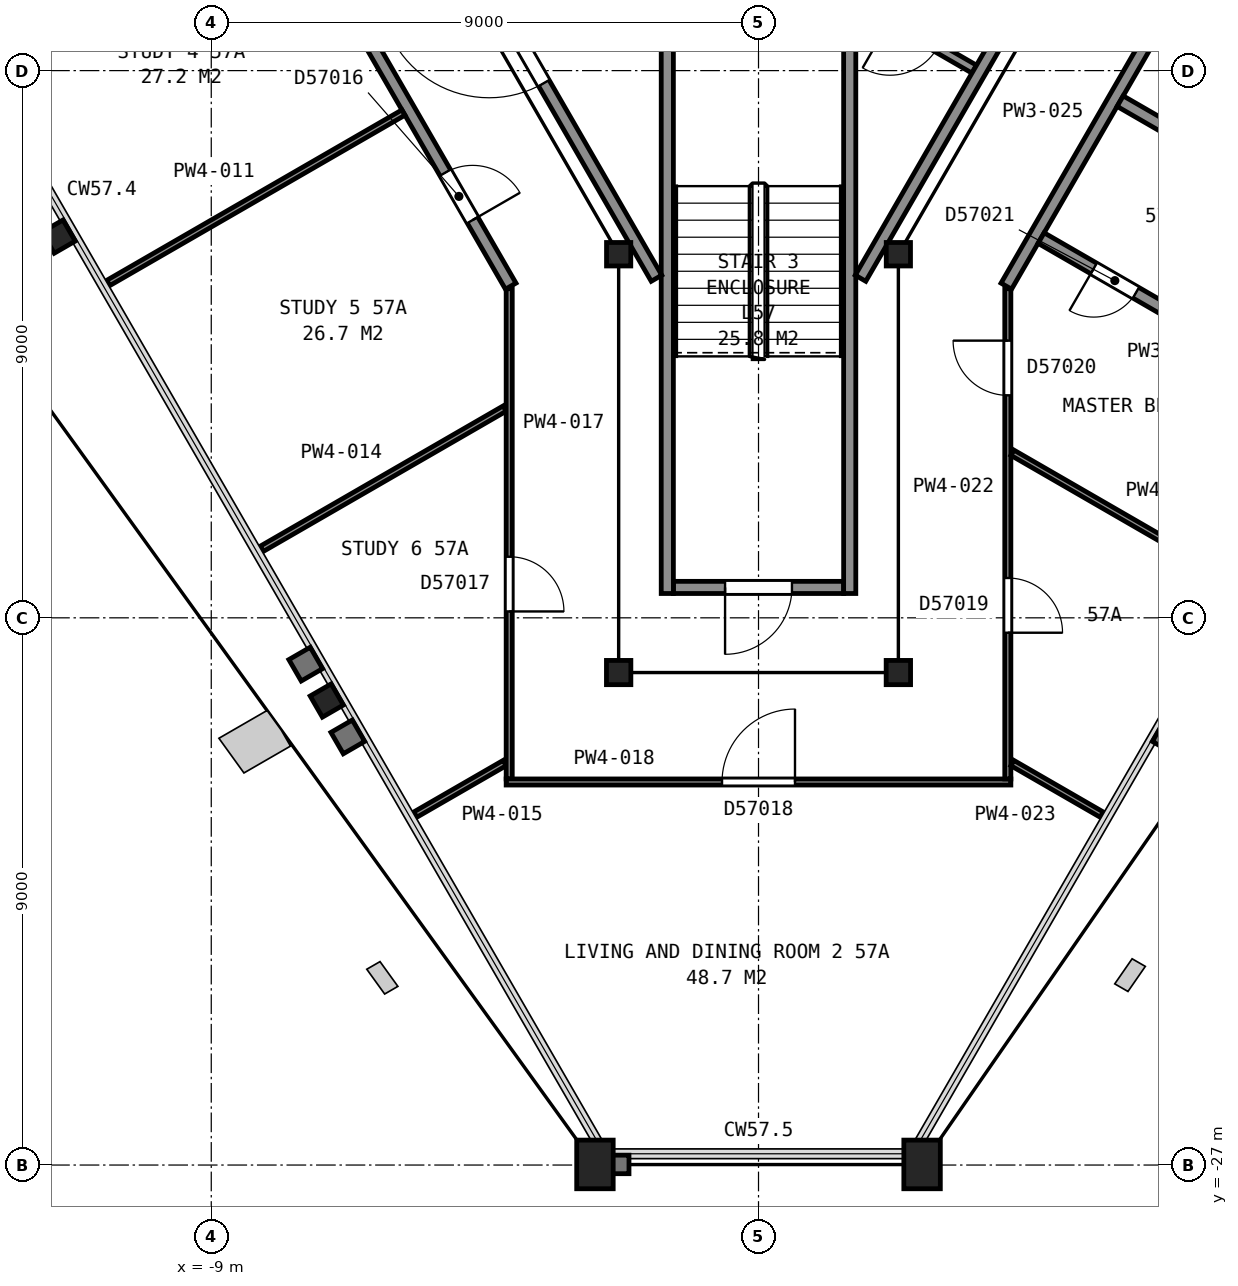
"""IFC4 building model, lengths in metres.
Left out: names, types, materials, properties, quantities, classifications, styles, units other than length and angle.
Written with IfcOpenShell. Run it as: python <this file> out.ifc"""

import sys

from ifc_helpers import new_model, si_unit, direction, frame, frame_2d, origin, origin_2d, place, context, subcontext, project, spatial, rectangle, hollow_rectangle, i_section, extrude, element, fill, save


model = new_model("IFC4")
c1 = context("Model", 3, precision=1e-05, world=origin(), true_north=direction((0.0, 1.0)))
c2 = subcontext(c1, "Body", "Model", "MODEL_VIEW")
j1 = project(units=[si_unit("LENGTHUNIT", "METRE"), si_unit("PLANEANGLEUNIT", "RADIAN")], contexts=[c1])
p1 = place(None, origin())
s1 = spatial("IfcSite", under=j1, at=p1, CompositionType="ELEMENT")
p2 = place(p1, origin())
s2 = spatial("IfcBuilding", under=s1, at=p2, CompositionType="ELEMENT")
p3 = place(p2, frame((0.0, 0.0, 228.6)))
s3 = spatial("IfcBuildingStorey", under=s2, at=p3, CompositionType="ELEMENT", Elevation=228.6)
for number, where, z_axis, x_axis in (
    (1, (-11.51, -11.73, 0.0), (0.0, 0.0, 1.0), (-0.5, 0.866, 0.0)),
    (2, (-7.1, -19.36, 0.0), (0.0, 0.0, 1.0), (-0.5, 0.866, 0.0)),
):
    element("IfcColumn", number, at=place(p3, frame(where, z_axis=z_axis, x_axis=x_axis)), inside=s3, PredefinedType="COLUMN", context=c2, shape_type="SweptSolid", body=[
        extrude(i_section(OverallWidth=0.401, OverallDepth=0.399, WebThickness=0.025, FlangeThickness=0.04, FilletRadius=0.015, at=origin_2d()), origin(), (0.0, 0.0, 1.0), 3.665),
    ])
for number, where, z_axis, x_axis in (
    (3, (-2.69, -26.99, 0.0), (0.0, 0.0, 1.0), (-1.0, 0.0, 0.0)),
    (4, (2.69, -26.99, 0.0), (0.0, 0.0, 1.0), (-1.0, 0.0, 0.0)),
):
    element("IfcColumn", number, at=place(p3, frame(where, z_axis=z_axis, x_axis=x_axis)), inside=s3, PredefinedType="COLUMN", context=c2, shape_type="SweptSolid", body=[
        extrude(hollow_rectangle(XDim=0.6, YDim=0.8, WallThickness=0.05, at=origin_2d()), origin(), (0.0, 0.0, 1.0), 3.635),
    ])
p4 = place(p3, frame((-2.3, -12.02, 0.0), z_axis=(0.0, 0.0, 1.0), x_axis=(1.0, 0.0, 0.0)))
e5 = element("IfcColumn", 5, at=p4, inside=s3, PredefinedType="COLUMN", context=c2, shape_type="SweptSolid", body=[
    extrude(i_section(OverallWidth=0.399, OverallDepth=0.386, WebThickness=0.021, FlangeThickness=0.033, FilletRadius=0.015, at=origin_2d()), origin(), (0.0, 0.0, 1.0), 3.7),
])
for number, where, z_axis, x_axis in (
    (6, (-2.3, -18.9, 0.0), (0.0, 0.0, 1.0), (-1.0, 0.0, 0.0)),
    (7, (2.3, -18.9, 0.0), (0.0, 0.0, 1.0), (-1.0, 0.0, 0.0)),
):
    element("IfcColumn", number, at=place(p3, frame(where, z_axis=z_axis, x_axis=x_axis)), inside=s3, PredefinedType="COLUMN", context=c2, shape_type="SweptSolid", body=[
        extrude(i_section(OverallWidth=0.401, OverallDepth=0.399, WebThickness=0.025, FlangeThickness=0.04, FilletRadius=0.015, at=origin_2d()), origin(), (0.0, 0.0, 1.0), 3.7),
    ])
p5 = place(p3, frame((2.3, -12.02, 0.0), z_axis=(0.0, 0.0, 1.0), x_axis=(1.0, 0.0, 0.0)))
e8 = element("IfcColumn", 8, at=p5, inside=s3, PredefinedType="COLUMN", context=c2, shape_type="SweptSolid", body=[
    extrude(i_section(OverallWidth=0.399, OverallDepth=0.386, WebThickness=0.021, FlangeThickness=0.033, FilletRadius=0.015, at=origin_2d()), origin(), (0.0, 0.0, 1.0), 3.7),
])
p6 = place(p3, frame((-1.4, -17.5, 0.0), z_axis=(0.0, 0.0, 1.0), x_axis=(1.0, 0.0, 0.0)))
e9 = element("IfcWall", 9, at=p6, inside=s3, PredefinedType="PARTITIONING", context=c2, shape_type="SweptSolid", body=[
    extrude(rectangle(XDim=2.8, YDim=0.2, at=frame_2d((1.4, 0.0))), origin(), (0.0, 0.0, 1.0), 3.45),
])
p7 = place(p6, frame((0.85, 0.0, 0.0)))
e10 = element("IfcOpeningElement", 10, at=p7, cuts=e9, PredefinedType="OPENING", context=c2, shape_type="SweptSolid", body=[
    extrude(rectangle(XDim=1.1, YDim=2.1, at=frame_2d((0.55, 1.05))), frame((0.0, 0.11, 0.0), z_axis=(0.0, -1.0, 0.0), x_axis=(1.0, 0.0, 0.0)), (0.0, 0.0, 1.0), 0.22),
])
for number, where, z_axis, x_axis in (
    (11, (1.5, -8.0, 0.0), (0.0, 0.0, 1.0), (0.0, -1.0, 0.0)),
    (12, (-1.5, -8.0, 0.0), (0.0, 0.0, 1.0), (0.0, -1.0, 0.0)),
):
    element("IfcWall", number, at=place(p3, frame(where, z_axis=z_axis, x_axis=x_axis)), inside=s3, PredefinedType="PARTITIONING", context=c2, shape_type="SweptSolid", body=[
        extrude(rectangle(XDim=9.6, YDim=0.2, at=frame_2d((4.8, 0.0))), origin(), (0.0, 0.0, 1.0), 3.45),
    ])
p8 = place(p3, frame((-4.655, -7.257, 0.0), z_axis=(0.0, 0.0, 1.0), x_axis=(0.499966124405, -0.866044960985, 0.0)))
e13 = element("IfcWall", 13, at=p8, inside=s3, PredefinedType="PARTITIONING", context=c2, shape_type="SweptSolid", body=[
    extrude(rectangle(XDim=5.956, YDim=0.2, at=frame_2d((2.978, 0.0))), origin(), (0.0, 0.0, 1.0), 3.45),
])
p9 = place(p8, frame((0.45, 0.0, 0.0)))
e14 = element("IfcOpeningElement", 14, at=p9, cuts=e13, PredefinedType="OPENING", context=c2, shape_type="SweptSolid", body=[
    extrude(rectangle(XDim=1.8, YDim=2.1, at=frame_2d((0.9, 1.05))), frame((0.0, 0.11, 0.0), z_axis=(0.0, -1.0, 0.0), x_axis=(1.0, 0.0, 0.0)), (0.0, 0.0, 1.0), 0.22),
])
p10 = place(p3, frame((1.404, -7.739, 0.0), z_axis=(0.0, 0.0, 1.0), x_axis=(0.866006523861, -0.500032699561, 0.0)))
e15 = element("IfcWall", 15, at=p10, inside=s3, PredefinedType="PARTITIONING", context=c2, shape_type="SweptSolid", body=[
    extrude(rectangle(XDim=2.475, YDim=0.15, at=frame_2d((1.237, 0.0))), origin(), (0.0, 0.0, 1.0), 3.45),
])
p11 = place(p10, frame((0.875, 0.0, 0.0)))
e16 = element("IfcOpeningElement", 16, at=p11, cuts=e15, PredefinedType="OPENING", context=c2, shape_type="SweptSolid", body=[
    extrude(rectangle(XDim=0.9, YDim=2.1, at=frame_2d((0.45, 1.05))), frame((0.0, 0.085, 0.0), z_axis=(0.0, -1.0, 0.0), x_axis=(1.0, 0.0, 0.0)), (0.0, 0.0, 1.0), 0.17),
])
p12 = place(p3, frame((1.677, -12.415, 0.0), z_axis=(0.0, 0.0, 1.0), x_axis=(0.500054337157, 0.865994029939, 0.0)))
e17 = element("IfcWall", 17, at=p12, inside=s3, PredefinedType="PARTITIONING", context=c2, shape_type="SweptSolid", body=[
    extrude(rectangle(XDim=6.177, YDim=0.2, at=frame_2d((3.088, 0.0))), origin(), (0.0, 0.0, 1.0), 3.45),
])
p13 = place(p3, frame((-4.075, -12.545, 0.0), z_axis=(0.0, 0.0, 1.0), x_axis=(-0.499997769292, 0.86602669168, 0.0)))
e18 = element("IfcWall", 18, at=p13, inside=s3, PredefinedType="PARTITIONING", context=c2, shape_type="SweptSolid", body=[
    extrude(rectangle(XDim=17.706, YDim=0.2, at=frame_2d((8.853, 0.0))), origin(), (0.0, 0.0, 1.0), 2.713),
])
p14 = place(p13, frame((14.138, 0.0, 0.0)))
e19 = element("IfcOpeningElement", 19, at=p14, cuts=e18, PredefinedType="OPENING", context=c2, shape_type="SweptSolid", body=[
    extrude(rectangle(XDim=0.9, YDim=2.1, at=frame_2d((0.45, 1.05))), frame((0.0, 0.11, 0.0), z_axis=(0.0, -1.0, 0.0), x_axis=(1.0, 0.0, 0.0)), (0.0, 0.0, 1.0), 0.22),
])
p15 = place(p13, frame((11.328, 0.0, 0.0)))
e20 = element("IfcOpeningElement", 20, at=p15, cuts=e18, PredefinedType="OPENING", context=c2, shape_type="SweptSolid", body=[
    extrude(rectangle(XDim=0.9, YDim=2.1, at=frame_2d((0.45, 1.05))), frame((0.0, 0.11, 0.0), z_axis=(0.0, -1.0, 0.0), x_axis=(1.0, 0.0, 0.0)), (0.0, 0.0, 1.0), 0.22),
])
p16 = place(p13, frame((5.454, 0.0, 0.0)))
e21 = element("IfcOpeningElement", 21, at=p16, cuts=e18, PredefinedType="OPENING", context=c2, shape_type="SweptSolid", body=[
    extrude(rectangle(XDim=0.9, YDim=2.1, at=frame_2d((0.45, 1.05))), frame((0.0, 0.11, 0.0), z_axis=(0.0, -1.0, 0.0), x_axis=(1.0, 0.0, 0.0)), (0.0, 0.0, 1.0), 0.22),
])
p17 = place(p13, frame((1.255, 0.0, 0.0)))
e22 = element("IfcOpeningElement", 22, at=p17, cuts=e18, PredefinedType="OPENING", context=c2, shape_type="SweptSolid", body=[
    extrude(rectangle(XDim=0.9, YDim=2.1, at=frame_2d((0.45, 1.05))), frame((0.0, 0.11, 0.0), z_axis=(0.0, -1.0, 0.0), x_axis=(1.0, 0.0, 0.0)), (0.0, 0.0, 1.0), 0.22),
])
p18 = place(p3, frame((-10.693, -12.492, 0.0), z_axis=(0.0, 0.0, 1.0), x_axis=(0.866017266313, 0.500014094249, 0.0)))
e23 = element("IfcWall", 23, at=p18, inside=s3, PredefinedType="PARTITIONING", context=c2, shape_type="SweptSolid", body=[
    extrude(rectangle(XDim=5.604, YDim=0.1, at=frame_2d((2.802, 0.0))), origin(), (0.0, 0.0, 1.0), 2.713),
])
p19 = place(p3, frame((-8.168, -16.864, 0.0), z_axis=(0.0, 0.0, 1.0), x_axis=(0.865969539539, 0.50009674723, 0.0)))
e24 = element("IfcWall", 24, at=p19, inside=s3, PredefinedType="PARTITIONING", context=c2, shape_type="SweptSolid", body=[
    extrude(rectangle(XDim=4.611, YDim=0.1, at=frame_2d((2.305, 0.0))), origin(), (0.0, 0.0, 1.0), 2.713),
])
p20 = place(p3, frame((-5.644, -21.236, 0.0), z_axis=(0.0, 0.0, 1.0), x_axis=(0.866046548355, 0.49996337474, 0.0)))
e25 = element("IfcWall", 25, at=p20, inside=s3, PredefinedType="PARTITIONING", context=c2, shape_type="SweptSolid", body=[
    extrude(rectangle(XDim=1.696, YDim=0.1, at=frame_2d((0.848, 0.0))), origin(), (0.0, 0.0, 1.0), 2.713),
])
p21 = place(p3, frame((-4.1, -20.65, 0.0), z_axis=(0.0, 0.0, 1.0), x_axis=(0.0, 1.0, 0.0)))
e26 = element("IfcWall", 26, at=p21, inside=s3, PredefinedType="PARTITIONING", context=c2, shape_type="SweptSolid", body=[
    extrude(rectangle(XDim=8.063, YDim=0.1, at=frame_2d((4.031, 0.0))), origin(), (0.0, 0.0, 1.0), 2.713),
])
p22 = place(p21, frame((2.755, 0.0, 0.0)))
e27 = element("IfcOpeningElement", 27, at=p22, cuts=e26, PredefinedType="OPENING", context=c2, shape_type="SweptSolid", body=[
    extrude(rectangle(XDim=0.9, YDim=2.1, at=frame_2d((0.45, 1.05))), frame((0.0, 0.06, 0.0), z_axis=(0.0, -1.0, 0.0), x_axis=(1.0, 0.0, 0.0)), (0.0, 0.0, 1.0), 0.12),
])
p23 = place(p3, frame((4.15, -20.7, 0.0), z_axis=(0.0, 0.0, 1.0), x_axis=(-1.0, 0.0, 0.0)))
e28 = element("IfcWall", 28, at=p23, inside=s3, PredefinedType="PARTITIONING", context=c2, shape_type="SweptSolid", body=[
    extrude(rectangle(XDim=8.3, YDim=0.1, at=frame_2d((4.15, 0.0))), origin(), (0.0, 0.0, 1.0), 2.713),
])
p24 = place(p23, frame((3.55, 0.0, 0.0)))
e29 = element("IfcOpeningElement", 29, at=p24, cuts=e28, PredefinedType="OPENING", context=c2, shape_type="SweptSolid", body=[
    extrude(rectangle(XDim=1.2, YDim=2.1, at=frame_2d((0.6, 1.05))), frame((0.0, 0.06, 0.0), z_axis=(0.0, -1.0, 0.0), x_axis=(1.0, 0.0, 0.0)), (0.0, 0.0, 1.0), 0.12),
])
p25 = place(p3, frame((4.1, -12.587, 0.0), z_axis=(0.0, 0.0, 1.0), x_axis=(0.0, -1.0, 0.0)))
e30 = element("IfcWall", 30, at=p25, inside=s3, PredefinedType="PARTITIONING", context=c2, shape_type="SweptSolid", body=[
    extrude(rectangle(XDim=8.063, YDim=0.1, at=frame_2d((4.031, 0.0))), origin(), (0.0, 0.0, 1.0), 2.713),
])
p26 = place(p25, frame((4.758, 0.0, 0.0)))
e31 = element("IfcOpeningElement", 31, at=p26, cuts=e30, PredefinedType="OPENING", context=c2, shape_type="SweptSolid", body=[
    extrude(rectangle(XDim=0.9, YDim=2.1, at=frame_2d((0.45, 1.05))), frame((0.0, 0.06, 0.0), z_axis=(0.0, -1.0, 0.0), x_axis=(1.0, 0.0, 0.0)), (0.0, 0.0, 1.0), 0.12),
])
p27 = place(p25, frame((0.854, 0.0, 0.0)))
e32 = element("IfcOpeningElement", 32, at=p27, cuts=e30, PredefinedType="OPENING", context=c2, shape_type="SweptSolid", body=[
    extrude(rectangle(XDim=0.9, YDim=2.1, at=frame_2d((0.45, 1.05))), frame((0.0, 0.06, 0.0), z_axis=(0.0, -1.0, 0.0), x_axis=(1.0, 0.0, 0.0)), (0.0, 0.0, 1.0), 0.12),
])
p28 = place(p3, frame((4.175, -20.388, 0.0), z_axis=(0.0, 0.0, 1.0), x_axis=(0.866046548355, -0.49996337474, 0.0)))
e33 = element("IfcWall", 33, at=p28, inside=s3, PredefinedType="PARTITIONING", context=c2, shape_type="SweptSolid", body=[
    extrude(rectangle(XDim=1.696, YDim=0.1, at=frame_2d((0.848, 0.0))), origin(), (0.0, 0.0, 1.0), 2.713),
])
p29 = place(p3, frame((4.175, -15.284, 0.0), z_axis=(0.0, 0.0, 1.0), x_axis=(0.86603819212, -0.4999778493, 0.0)))
e34 = element("IfcWall", 34, at=p29, inside=s3, PredefinedType="PARTITIONING", context=c2, shape_type="SweptSolid", body=[
    extrude(rectangle(XDim=4.248, YDim=0.1, at=frame_2d((2.124, 0.0))), origin(), (0.0, 0.0, 1.0), 2.713),
])
p30 = place(p3, frame((12.903, 2.745, 0.0), z_axis=(0.0, 0.0, 1.0), x_axis=(-0.499999743747, -0.866025551732, 0.0)))
e35 = element("IfcWall", 35, at=p30, inside=s3, PredefinedType="PARTITIONING", context=c2, shape_type="SweptSolid", body=[
    extrude(rectangle(XDim=17.656, YDim=0.2, at=frame_2d((8.828, 0.0))), origin(), (0.0, 0.0, 1.0), 2.713),
])
p31 = place(p30, frame((10.134, 0.0, 0.0)))
e36 = element("IfcOpeningElement", 36, at=p31, cuts=e35, PredefinedType="OPENING", context=c2, shape_type="SweptSolid", body=[
    extrude(rectangle(XDim=0.9, YDim=2.1, at=frame_2d((0.45, 1.05))), frame((0.0, 0.11, 0.0), z_axis=(0.0, -1.0, 0.0), x_axis=(1.0, 0.0, 0.0)), (0.0, 0.0, 1.0), 0.22),
])
p32 = place(p30, frame((6.073, 0.0, 0.0)))
e37 = element("IfcOpeningElement", 37, at=p32, cuts=e35, PredefinedType="OPENING", context=c2, shape_type="SweptSolid", body=[
    extrude(rectangle(XDim=0.9, YDim=2.1, at=frame_2d((0.45, 1.05))), frame((0.0, 0.11, 0.0), z_axis=(0.0, -1.0, 0.0), x_axis=(1.0, 0.0, 0.0)), (0.0, 0.0, 1.0), 0.22),
])
p33 = place(p3, frame((4.648, -11.754, 0.0), z_axis=(0.0, 0.0, 1.0), x_axis=(0.866010750942, -0.50002537861, 0.0)))
e38 = element("IfcWall", 38, at=p33, inside=s3, PredefinedType="PARTITIONING", context=c2, shape_type="SweptSolid", body=[
    extrude(rectangle(XDim=3.0, YDim=0.2, at=frame_2d((1.5, 0.0))), origin(), (0.0, 0.0, 1.0), 2.713),
])
p34 = place(p33, frame((1.0, 0.0, 0.0)))
e39 = element("IfcOpeningElement", 39, at=p34, cuts=e38, PredefinedType="OPENING", context=c2, shape_type="SweptSolid", body=[
    extrude(rectangle(XDim=0.8, YDim=2.1, at=frame_2d((0.4, 1.05))), frame((0.0, 0.11, 0.0), z_axis=(0.0, -1.0, 0.0), x_axis=(1.0, 0.0, 0.0)), (0.0, 0.0, 1.0), 0.22),
])
p35 = place(p3, frame((5.948, -9.502, 0.0), z_axis=(0.0, 0.0, 1.0), x_axis=(0.866028157966, -0.499995229588, 0.0)))
e40 = element("IfcWall", 40, at=p35, inside=s3, PredefinedType="PARTITIONING", context=c2, shape_type="SweptSolid", body=[
    extrude(rectangle(XDim=5.604, YDim=0.2, at=frame_2d((2.802, 0.0))), origin(), (0.0, 0.0, 1.0), 2.713),
])
p36 = place(p7, origin())
e41 = element("IfcDoor", 41, at=p36, inside=s3, OperationType="SINGLE_SWING_LEFT", PredefinedType="DOOR", context=c2, shape_type="SweptSolid", body=[
    extrude(rectangle(XDim=1.1, YDim=2.1, at=frame_2d((0.55, 1.05))), frame((0.0, 0.025, 0.0), z_axis=(0.0, -1.0, 0.0), x_axis=(1.0, 0.0, 0.0)), (0.0, 0.0, 1.0), 0.05),
])
fill(e10, e41)
p37 = place(p9, origin())
e42 = element("IfcDoor", 42, at=p37, inside=s3, OperationType="DOUBLE_DOOR_SINGLE_SWING", PredefinedType="DOOR", context=c2, shape_type="SweptSolid", body=[
    extrude(rectangle(XDim=1.8, YDim=2.1, at=frame_2d((0.9, 1.05))), frame((0.0, 0.025, 0.0), z_axis=(0.0, -1.0, 0.0), x_axis=(1.0, 0.0, 0.0)), (0.0, 0.0, 1.0), 0.05),
])
fill(e14, e42)
p38 = place(p17, origin())
e43 = element("IfcDoor", 43, at=p38, inside=s3, OperationType="SINGLE_SWING_LEFT", PredefinedType="DOOR", context=c2, shape_type="SweptSolid", body=[
    extrude(rectangle(XDim=0.9, YDim=2.1, at=frame_2d((0.45, 1.05))), frame((0.0, 0.025, 0.0), z_axis=(0.0, -1.0, 0.0), x_axis=(1.0, 0.0, 0.0)), (0.0, 0.0, 1.0), 0.05),
])
fill(e22, e43)
p39 = place(p22, origin())
e44 = element("IfcDoor", 44, at=p39, inside=s3, OperationType="SINGLE_SWING_LEFT", PredefinedType="DOOR", context=c2, shape_type="SweptSolid", body=[
    extrude(rectangle(XDim=0.9, YDim=2.1, at=frame_2d((0.45, 1.05))), frame((0.0, 0.025, 0.0), z_axis=(0.0, -1.0, 0.0), x_axis=(1.0, 0.0, 0.0)), (0.0, 0.0, 1.0), 0.05),
])
fill(e27, e44)
p40 = place(p24, origin())
e45 = element("IfcDoor", 45, at=p40, inside=s3, OperationType="SINGLE_SWING_LEFT", PredefinedType="DOOR", context=c2, shape_type="SweptSolid", body=[
    extrude(rectangle(XDim=1.2, YDim=2.1, at=frame_2d((0.6, 1.05))), frame((0.0, 0.025, 0.0), z_axis=(0.0, -1.0, 0.0), x_axis=(1.0, 0.0, 0.0)), (0.0, 0.0, 1.0), 0.05),
])
fill(e29, e45)
p41 = place(p26, origin())
e46 = element("IfcDoor", 46, at=p41, inside=s3, OperationType="SINGLE_SWING_RIGHT", PredefinedType="DOOR", context=c2, shape_type="SweptSolid", body=[
    extrude(rectangle(XDim=0.9, YDim=2.1, at=frame_2d((0.45, 1.05))), frame((0.0, 0.025, 0.0), z_axis=(0.0, -1.0, 0.0), x_axis=(1.0, 0.0, 0.0)), (0.0, 0.0, 1.0), 0.05),
])
fill(e31, e46)
p42 = place(p27, origin())
e47 = element("IfcDoor", 47, at=p42, inside=s3, OperationType="SINGLE_SWING_LEFT", PredefinedType="DOOR", context=c2, shape_type="SweptSolid", body=[
    extrude(rectangle(XDim=0.9, YDim=2.1, at=frame_2d((0.45, 1.05))), frame((0.0, 0.025, 0.0), z_axis=(0.0, -1.0, 0.0), x_axis=(1.0, 0.0, 0.0)), (0.0, 0.0, 1.0), 0.05),
])
fill(e32, e47)
p43 = place(p34, origin())
e48 = element("IfcDoor", 48, at=p43, inside=s3, OperationType="SINGLE_SWING_LEFT", PredefinedType="DOOR", context=c2, shape_type="SweptSolid", body=[
    extrude(rectangle(XDim=0.8, YDim=2.1, at=frame_2d((0.4, 1.05))), frame((0.0, 0.025, 0.0), z_axis=(0.0, -1.0, 0.0), x_axis=(1.0, 0.0, 0.0)), (0.0, 0.0, 1.0), 0.05),
])
fill(e39, e48)
save(model, sys.argv[1])
